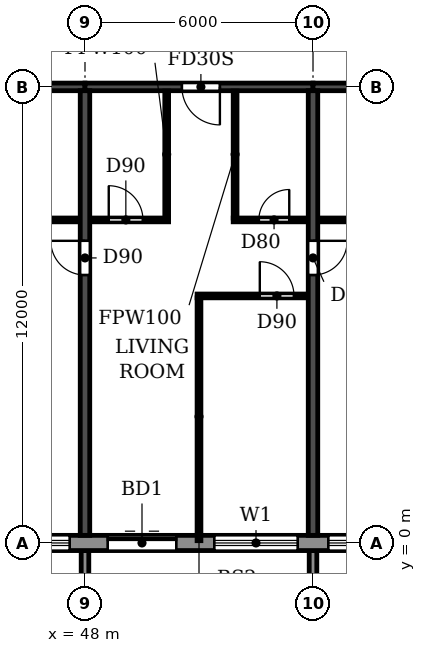
"""IFC4 building model, lengths in metres.
Left out: names, types, materials, properties, quantities, classifications, styles, units other than length and angle.
Written with IfcOpenShell. Run it as: python <this file> out.ifc"""

import sys

from ifc_helpers import new_model, si_unit, direction, frame, frame_2d, origin, place, context, subcontext, project, spatial, polyline, rectangle, outline, extrude, source, transform, mapped, element, fill, save


model = new_model("IFC4")
c1 = context("Model", 3, precision=1e-05, world=origin(), true_north=direction((0.0, 1.0)))
c2 = subcontext(c1, "Body", "Model", "MODEL_VIEW")
j1 = project(units=[si_unit("LENGTHUNIT", "METRE"), si_unit("PLANEANGLEUNIT", "RADIAN")], contexts=[c1])
p1 = place(None, origin())
s1 = spatial("IfcSite", under=j1, at=p1, CompositionType="ELEMENT")
p2 = place(p1, origin())
s2 = spatial("IfcBuilding", under=s1, at=p2, CompositionType="ELEMENT")
p3 = place(p2, frame((0.0, 0.0, 171.9)))
s3 = spatial("IfcBuildingStorey", under=s2, at=p3, CompositionType="ELEMENT", Elevation=171.9)
p4 = place(p3, frame((48.0, 0.2, 0.0), z_axis=(0.0, 0.0, 1.0), x_axis=(0.0, 1.0, 0.0)))
e1 = element("IfcWall", 1, at=p4, inside=s3, PredefinedType="SHEAR", context=c2, shape_type="SweptSolid", body=[
    extrude(rectangle(XDim=11.7, YDim=0.25, at=frame_2d((5.85, 0.0))), origin(), (0.0, 0.0, 1.0), 3.08),
])
p5 = place(p4, frame((6.85, 0.0, 0.0)))
e2 = element("IfcOpeningElement", 2, at=p5, cuts=e1, PredefinedType="OPENING", context=c2, shape_type="SweptSolid", body=[
    extrude(rectangle(XDim=0.9, YDim=2.1, at=frame_2d((0.45, 1.05))), frame((0.0, 0.135, 0.0), z_axis=(0.0, -1.0, 0.0), x_axis=(1.0, 0.0, 0.0)), (0.0, 0.0, 1.0), 0.27),
])
p6 = place(p3, frame((54.0, 0.2, 0.0), z_axis=(0.0, 0.0, 1.0), x_axis=(0.0, 1.0, 0.0)))
e3 = element("IfcWall", 3, at=p6, inside=s3, PredefinedType="SHEAR", context=c2, shape_type="SweptSolid", body=[
    extrude(rectangle(XDim=11.7, YDim=0.25, at=frame_2d((5.85, 0.0))), origin(), (0.0, 0.0, 1.0), 3.08),
])
p7 = place(p6, frame((6.85, 0.0, 0.0)))
e4 = element("IfcOpeningElement", 4, at=p7, cuts=e3, PredefinedType="OPENING", context=c2, shape_type="SweptSolid", body=[
    extrude(rectangle(XDim=0.9, YDim=2.1, at=frame_2d((0.45, 1.05))), frame((0.0, 0.135, 0.0), z_axis=(0.0, -1.0, 0.0), x_axis=(1.0, 0.0, 0.0)), (0.0, 0.0, 1.0), 0.27),
])
p8 = place(p3, frame((42.0, 12.0, 0.0), z_axis=(0.0, 0.0, 1.0), x_axis=(1.0, 0.0, 0.0)))
e5 = element("IfcWall", 5, at=p8, inside=s3, PredefinedType="SHEAR", context=c2, shape_type="SweptSolid", body=[
    extrude(rectangle(XDim=6.0, YDim=0.2, at=frame_2d((3.0, 0.0))), origin(), (0.0, 0.0, 1.0), 2.48),
])
p9 = place(p3, frame((48.0, 12.0, 0.0), z_axis=(0.0, 0.0, 1.0), x_axis=(1.0, 0.0, 0.0)))
e6 = element("IfcWall", 6, at=p9, inside=s3, PredefinedType="SHEAR", context=c2, shape_type="SweptSolid", body=[
    extrude(rectangle(XDim=6.0, YDim=0.2, at=frame_2d((3.0, 0.0))), origin(), (0.0, 0.0, 1.0), 2.48),
])
p10 = place(p9, frame((2.55, 0.0, 0.0)))
e7 = element("IfcOpeningElement", 7, at=p10, cuts=e6, PredefinedType="OPENING", context=c2, shape_type="SweptSolid", body=[
    extrude(rectangle(XDim=1.0, YDim=2.1, at=frame_2d((0.5, 1.05))), frame((0.0, 0.11, 0.0), z_axis=(0.0, -1.0, 0.0), x_axis=(1.0, 0.0, 0.0)), (0.0, 0.0, 1.0), 0.22),
])
p11 = place(p3, frame((54.0, 12.0, 0.0), z_axis=(0.0, 0.0, 1.0), x_axis=(1.0, 0.0, 0.0)))
e8 = element("IfcWall", 8, at=p11, inside=s3, PredefinedType="SHEAR", context=c2, shape_type="SweptSolid", body=[
    extrude(rectangle(XDim=6.0, YDim=0.2, at=frame_2d((3.0, 0.0))), origin(), (0.0, 0.0, 1.0), 2.48),
])
p12 = place(p3, frame((22.683, 0.0, 0.0), z_axis=(0.0, 0.0, 1.0), x_axis=(1.0, 0.0, 0.0)))
e9 = element("IfcWall", 9, at=p12, inside=s3, PredefinedType="STANDARD", context=c2, shape_type="SweptSolid", body=[
    extrude(rectangle(XDim=56.634, YDim=0.4, at=frame_2d((28.317, 0.0))), origin(), (0.0, 0.0, 1.0), 3.08),
])
p13 = place(p12, frame((1.717, 0.0, 0.9)))
e10 = element("IfcOpeningElement", 10, at=p13, cuts=e9, PredefinedType="OPENING", context=c2, shape_type="SweptSolid", body=[
    extrude(rectangle(XDim=2.2, YDim=1.5, at=frame_2d((1.1, 0.75))), frame((0.0, 0.21, 0.0), z_axis=(0.0, -1.0, 0.0), x_axis=(1.0, 0.0, 0.0)), (0.0, 0.0, 1.0), 0.42),
])
p14 = place(p12, frame((4.917, 0.0, 0.0)))
e11 = element("IfcOpeningElement", 11, at=p14, cuts=e9, PredefinedType="OPENING", context=c2, shape_type="SweptSolid", body=[
    extrude(rectangle(XDim=1.8, YDim=2.4, at=frame_2d((0.9, 1.2))), frame((0.0, 0.21, 0.0), z_axis=(0.0, -1.0, 0.0), x_axis=(1.0, 0.0, 0.0)), (0.0, 0.0, 1.0), 0.42),
])
p15 = place(p12, frame((7.717, 0.0, 0.9)))
e12 = element("IfcOpeningElement", 12, at=p15, cuts=e9, PredefinedType="OPENING", context=c2, shape_type="SweptSolid", body=[
    extrude(rectangle(XDim=2.2, YDim=1.5, at=frame_2d((1.1, 0.75))), frame((0.0, 0.21, 0.0), z_axis=(0.0, -1.0, 0.0), x_axis=(1.0, 0.0, 0.0)), (0.0, 0.0, 1.0), 0.42),
])
p16 = place(p12, frame((10.717, 0.0, 0.9)))
e13 = element("IfcOpeningElement", 13, at=p16, cuts=e9, PredefinedType="OPENING", context=c2, shape_type="SweptSolid", body=[
    extrude(rectangle(XDim=2.2, YDim=1.5, at=frame_2d((1.1, 0.75))), frame((0.0, 0.21, 0.0), z_axis=(0.0, -1.0, 0.0), x_axis=(1.0, 0.0, 0.0)), (0.0, 0.0, 1.0), 0.42),
])
p17 = place(p12, frame((13.717, 0.0, 0.9)))
e14 = element("IfcOpeningElement", 14, at=p17, cuts=e9, PredefinedType="OPENING", context=c2, shape_type="SweptSolid", body=[
    extrude(rectangle(XDim=2.2, YDim=1.5, at=frame_2d((1.1, 0.75))), frame((0.0, 0.21, 0.0), z_axis=(0.0, -1.0, 0.0), x_axis=(1.0, 0.0, 0.0)), (0.0, 0.0, 1.0), 0.42),
])
p18 = place(p12, frame((16.917, 0.0, 0.0)))
e15 = element("IfcOpeningElement", 15, at=p18, cuts=e9, PredefinedType="OPENING", context=c2, shape_type="SweptSolid", body=[
    extrude(rectangle(XDim=1.8, YDim=2.4, at=frame_2d((0.9, 1.2))), frame((0.0, 0.21, 0.0), z_axis=(0.0, -1.0, 0.0), x_axis=(1.0, 0.0, 0.0)), (0.0, 0.0, 1.0), 0.42),
])
p19 = place(p12, frame((19.717, 0.0, 0.9)))
e16 = element("IfcOpeningElement", 16, at=p19, cuts=e9, PredefinedType="OPENING", context=c2, shape_type="SweptSolid", body=[
    extrude(rectangle(XDim=2.2, YDim=1.5, at=frame_2d((1.1, 0.75))), frame((0.0, 0.21, 0.0), z_axis=(0.0, -1.0, 0.0), x_axis=(1.0, 0.0, 0.0)), (0.0, 0.0, 1.0), 0.42),
])
p20 = place(p12, frame((22.717, 0.0, 0.9)))
e17 = element("IfcOpeningElement", 17, at=p20, cuts=e9, PredefinedType="OPENING", context=c2, shape_type="SweptSolid", body=[
    extrude(rectangle(XDim=2.2, YDim=1.5, at=frame_2d((1.1, 0.75))), frame((0.0, 0.21, 0.0), z_axis=(0.0, -1.0, 0.0), x_axis=(1.0, 0.0, 0.0)), (0.0, 0.0, 1.0), 0.42),
])
p21 = place(p12, frame((25.917, 0.0, 0.0)))
e18 = element("IfcOpeningElement", 18, at=p21, cuts=e9, PredefinedType="OPENING", context=c2, shape_type="SweptSolid", body=[
    extrude(rectangle(XDim=1.8, YDim=2.4, at=frame_2d((0.9, 1.2))), frame((0.0, 0.21, 0.0), z_axis=(0.0, -1.0, 0.0), x_axis=(1.0, 0.0, 0.0)), (0.0, 0.0, 1.0), 0.42),
])
p22 = place(p12, frame((28.717, 0.0, 0.9)))
e19 = element("IfcOpeningElement", 19, at=p22, cuts=e9, PredefinedType="OPENING", context=c2, shape_type="SweptSolid", body=[
    extrude(rectangle(XDim=2.2, YDim=1.5, at=frame_2d((1.1, 0.75))), frame((0.0, 0.21, 0.0), z_axis=(0.0, -1.0, 0.0), x_axis=(1.0, 0.0, 0.0)), (0.0, 0.0, 1.0), 0.42),
])
p23 = place(p12, frame((31.717, 0.0, 0.9)))
e20 = element("IfcOpeningElement", 20, at=p23, cuts=e9, PredefinedType="OPENING", context=c2, shape_type="SweptSolid", body=[
    extrude(rectangle(XDim=2.2, YDim=1.5, at=frame_2d((1.1, 0.75))), frame((0.0, 0.21, 0.0), z_axis=(0.0, -1.0, 0.0), x_axis=(1.0, 0.0, 0.0)), (0.0, 0.0, 1.0), 0.42),
])
p24 = place(p12, frame((34.717, 0.0, 0.9)))
e21 = element("IfcOpeningElement", 21, at=p24, cuts=e9, PredefinedType="OPENING", context=c2, shape_type="SweptSolid", body=[
    extrude(rectangle(XDim=2.2, YDim=1.5, at=frame_2d((1.1, 0.75))), frame((0.0, 0.21, 0.0), z_axis=(0.0, -1.0, 0.0), x_axis=(1.0, 0.0, 0.0)), (0.0, 0.0, 1.0), 0.42),
])
p25 = place(p12, frame((37.717, 0.0, 0.9)))
e22 = element("IfcOpeningElement", 22, at=p25, cuts=e9, PredefinedType="OPENING", context=c2, shape_type="SweptSolid", body=[
    extrude(rectangle(XDim=2.2, YDim=1.5, at=frame_2d((1.1, 0.75))), frame((0.0, 0.21, 0.0), z_axis=(0.0, -1.0, 0.0), x_axis=(1.0, 0.0, 0.0)), (0.0, 0.0, 1.0), 0.42),
])
p26 = place(p12, frame((40.917, 0.0, 0.0)))
e23 = element("IfcOpeningElement", 23, at=p26, cuts=e9, PredefinedType="OPENING", context=c2, shape_type="SweptSolid", body=[
    extrude(rectangle(XDim=1.8, YDim=2.4, at=frame_2d((0.9, 1.2))), frame((0.0, 0.21, 0.0), z_axis=(0.0, -1.0, 0.0), x_axis=(1.0, 0.0, 0.0)), (0.0, 0.0, 1.0), 0.42),
])
p27 = place(p12, frame((43.717, 0.0, 0.9)))
e24 = element("IfcOpeningElement", 24, at=p27, cuts=e9, PredefinedType="OPENING", context=c2, shape_type="SweptSolid", body=[
    extrude(rectangle(XDim=2.2, YDim=1.5, at=frame_2d((1.1, 0.75))), frame((0.0, 0.21, 0.0), z_axis=(0.0, -1.0, 0.0), x_axis=(1.0, 0.0, 0.0)), (0.0, 0.0, 1.0), 0.42),
])
p28 = place(p12, frame((46.717, 0.0, 0.9)))
e25 = element("IfcOpeningElement", 25, at=p28, cuts=e9, PredefinedType="OPENING", context=c2, shape_type="SweptSolid", body=[
    extrude(rectangle(XDim=2.2, YDim=1.5, at=frame_2d((1.1, 0.75))), frame((0.0, 0.21, 0.0), z_axis=(0.0, -1.0, 0.0), x_axis=(1.0, 0.0, 0.0)), (0.0, 0.0, 1.0), 0.42),
])
p29 = place(p12, frame((49.717, 0.0, 0.9)))
e26 = element("IfcOpeningElement", 26, at=p29, cuts=e9, PredefinedType="OPENING", context=c2, shape_type="SweptSolid", body=[
    extrude(rectangle(XDim=2.2, YDim=1.5, at=frame_2d((1.1, 0.75))), frame((0.0, 0.21, 0.0), z_axis=(0.0, -1.0, 0.0), x_axis=(1.0, 0.0, 0.0)), (0.0, 0.0, 1.0), 0.42),
])
p30 = place(p12, frame((52.917, 0.0, 0.0)))
e27 = element("IfcOpeningElement", 27, at=p30, cuts=e9, PredefinedType="OPENING", context=c2, shape_type="SweptSolid", body=[
    extrude(rectangle(XDim=1.8, YDim=2.4, at=frame_2d((0.9, 1.2))), frame((0.0, 0.21, 0.0), z_axis=(0.0, -1.0, 0.0), x_axis=(1.0, 0.0, 0.0)), (0.0, 0.0, 1.0), 0.42),
])
m1 = source(origin(), c2, "Body", "SweptSolid", [
    extrude(outline(polyline([(0.0, 0.0), (0.2, 0.0), (0.2, 1.65), (0.0, 1.65), (0.0, 0.0)])), origin(), (0.0, 0.0, 1.0), 3.1),
])
for number, where in (
    (28, (47.9, -1.85, 0.0)),
    (29, (53.9, -1.85, 0.0)),
):
    element("IfcWall", number, at=place(p3, frame(where)), inside=s3, PredefinedType="STANDARD", context=c2, shape_type="MappedRepresentation", body=[
        mapped(m1, transform((0.0, 0.0, 0.0))),
    ])
p31 = place(p3, frame((50.95, 6.5, 0.0), z_axis=(0.0, 0.0, 1.0), x_axis=(1.0, 0.0, 0.0)))
e30 = element("IfcWall", 30, at=p31, inside=s3, PredefinedType="PARTITIONING", context=c2, shape_type="SweptSolid", body=[
    extrude(rectangle(XDim=2.915, YDim=0.1, at=frame_2d((1.458, 0.0))), origin(), (0.0, 0.0, 1.0), 3.08),
])
p32 = place(p31, frame((1.65, 0.0, 0.0)))
e31 = element("IfcOpeningElement", 31, at=p32, cuts=e30, PredefinedType="OPENING", context=c2, shape_type="SweptSolid", body=[
    extrude(rectangle(XDim=0.9, YDim=2.1, at=frame_2d((0.45, 1.05))), frame((0.0, 0.06, 0.0), z_axis=(0.0, -1.0, 0.0), x_axis=(1.0, 0.0, 0.0)), (0.0, 0.0, 1.0), 0.12),
])
p33 = place(p3, frame((45.1, 8.5, 0.0), z_axis=(0.0, 0.0, 1.0), x_axis=(1.0, 0.0, 0.0)))
e32 = element("IfcWall", 32, at=p33, inside=s3, PredefinedType="PARTITIONING", context=c2, shape_type="SweptSolid", body=[
    extrude(rectangle(XDim=2.765, YDim=0.1, at=frame_2d((1.382, 0.0))), origin(), (0.0, 0.0, 1.0), 3.08),
])
p34 = place(p33, frame((1.0, 0.0, 0.0)))
e33 = element("IfcOpeningElement", 33, at=p34, cuts=e32, PredefinedType="OPENING", context=c2, shape_type="SweptSolid", body=[
    extrude(rectangle(XDim=0.8, YDim=2.1, at=frame_2d((0.4, 1.05))), frame((0.0, 0.06, 0.0), z_axis=(0.0, -1.0, 0.0), x_axis=(1.0, 0.0, 0.0)), (0.0, 0.0, 1.0), 0.12),
])
p35 = place(p3, frame((48.135, 8.5, 0.0), z_axis=(0.0, 0.0, 1.0), x_axis=(1.0, 0.0, 0.0)))
e34 = element("IfcWall", 34, at=p35, inside=s3, PredefinedType="PARTITIONING", context=c2, shape_type="SweptSolid", body=[
    extrude(rectangle(XDim=2.065, YDim=0.1, at=frame_2d((1.032, 0.0))), origin(), (0.0, 0.0, 1.0), 3.08),
])
p36 = place(p35, frame((0.49, 0.0, 0.0)))
e35 = element("IfcOpeningElement", 35, at=p36, cuts=e34, PredefinedType="OPENING", context=c2, shape_type="SweptSolid", body=[
    extrude(rectangle(XDim=0.9, YDim=2.1, at=frame_2d((0.45, 1.05))), frame((0.0, 0.06, 0.0), z_axis=(0.0, -1.0, 0.0), x_axis=(1.0, 0.0, 0.0)), (0.0, 0.0, 1.0), 0.12),
])
p37 = place(p3, frame((51.9, 8.5, 0.0), z_axis=(0.0, 0.0, 1.0), x_axis=(1.0, 0.0, 0.0)))
e36 = element("IfcWall", 36, at=p37, inside=s3, PredefinedType="PARTITIONING", context=c2, shape_type="SweptSolid", body=[
    extrude(rectangle(XDim=1.965, YDim=0.1, at=frame_2d((0.982, 0.0))), origin(), (0.0, 0.0, 1.0), 3.08),
])
p38 = place(p37, frame((0.675, 0.0, 0.0)))
e37 = element("IfcOpeningElement", 37, at=p38, cuts=e36, PredefinedType="OPENING", context=c2, shape_type="SweptSolid", body=[
    extrude(rectangle(XDim=0.8, YDim=2.1, at=frame_2d((0.4, 1.05))), frame((0.0, 0.06, 0.0), z_axis=(0.0, -1.0, 0.0), x_axis=(1.0, 0.0, 0.0)), (0.0, 0.0, 1.0), 0.12),
])
p39 = place(p3, frame((54.135, 8.5, 0.0), z_axis=(0.0, 0.0, 1.0), x_axis=(1.0, 0.0, 0.0)))
e38 = element("IfcWall", 38, at=p39, inside=s3, PredefinedType="PARTITIONING", context=c2, shape_type="SweptSolid", body=[
    extrude(rectangle(XDim=2.765, YDim=0.1, at=frame_2d((1.382, 0.0))), origin(), (0.0, 0.0, 1.0), 3.08),
])
p40 = place(p39, frame((0.965, 0.0, 0.0)))
e39 = element("IfcOpeningElement", 39, at=p40, cuts=e38, PredefinedType="OPENING", context=c2, shape_type="SweptSolid", body=[
    extrude(rectangle(XDim=0.8, YDim=2.1, at=frame_2d((0.4, 1.05))), frame((0.0, 0.06, 0.0), z_axis=(0.0, -1.0, 0.0), x_axis=(1.0, 0.0, 0.0)), (0.0, 0.0, 1.0), 0.12),
])
p41 = place(p3, frame((50.15, 8.55, 0.0), z_axis=(0.0, 0.0, 1.0), x_axis=(0.0, 1.0, 0.0)))
e40 = element("IfcWall", 40, at=p41, inside=s3, PredefinedType="PARTITIONING", context=c2, shape_type="SweptSolid", body=[
    extrude(rectangle(XDim=3.34, YDim=0.1, at=frame_2d((1.67, 0.0))), origin(), (0.0, 0.0, 1.0), 3.08),
])
p42 = place(p3, frame((51.0, 0.06, 0.0), z_axis=(0.0, 0.0, 1.0), x_axis=(0.0, 1.0, 0.0)))
e41 = element("IfcWall", 41, at=p42, inside=s3, PredefinedType="PARTITIONING", context=c2, shape_type="SweptSolid", body=[
    extrude(rectangle(XDim=6.39, YDim=0.1, at=frame_2d((3.195, 0.0))), origin(), (0.0, 0.0, 1.0), 3.08),
])
p43 = place(p3, frame((51.95, 8.55, 0.0), z_axis=(0.0, 0.0, 1.0), x_axis=(0.0, 1.0, 0.0)))
e42 = element("IfcWall", 42, at=p43, inside=s3, PredefinedType="PARTITIONING", context=c2, shape_type="SweptSolid", body=[
    extrude(rectangle(XDim=3.34, YDim=0.1, at=frame_2d((1.67, 0.0))), origin(), (0.0, 0.0, 1.0), 3.08),
])
p44 = place(p20, origin())
e43 = element("IfcWindow", 43, at=p44, inside=s3, PartitioningType="DOUBLE_PANEL_HORIZONTAL", PredefinedType="WINDOW", context=c2, shape_type="SweptSolid", body=[
    extrude(rectangle(XDim=2.2, YDim=1.5, at=frame_2d((1.1, 0.75))), frame((0.0, 0.03, 0.0), z_axis=(0.0, -1.0, 0.0), x_axis=(1.0, 0.0, 0.0)), (0.0, 0.0, 1.0), 0.06),
])
fill(e17, e43)
p45 = place(p21, origin())
e44 = element("IfcDoor", 44, at=p45, inside=s3, OperationType="DOUBLE_DOOR_SLIDING", PredefinedType="DOOR", context=c2, shape_type="SweptSolid", body=[
    extrude(rectangle(XDim=1.8, YDim=2.4, at=frame_2d((0.9, 1.2))), frame((0.0, 0.025, 0.0), z_axis=(0.0, -1.0, 0.0), x_axis=(1.0, 0.0, 0.0)), (0.0, 0.0, 1.0), 0.05),
])
fill(e18, e44)
p46 = place(p22, origin())
e45 = element("IfcWindow", 45, at=p46, inside=s3, PartitioningType="DOUBLE_PANEL_HORIZONTAL", PredefinedType="WINDOW", context=c2, shape_type="SweptSolid", body=[
    extrude(rectangle(XDim=2.2, YDim=1.5, at=frame_2d((1.1, 0.75))), frame((0.0, 0.03, 0.0), z_axis=(0.0, -1.0, 0.0), x_axis=(1.0, 0.0, 0.0)), (0.0, 0.0, 1.0), 0.06),
])
fill(e19, e45)
p47 = place(p23, origin())
e46 = element("IfcWindow", 46, at=p47, inside=s3, PartitioningType="DOUBLE_PANEL_HORIZONTAL", PredefinedType="WINDOW", context=c2, shape_type="SweptSolid", body=[
    extrude(rectangle(XDim=2.2, YDim=1.5, at=frame_2d((1.1, 0.75))), frame((0.0, 0.03, 0.0), z_axis=(0.0, -1.0, 0.0), x_axis=(1.0, 0.0, 0.0)), (0.0, 0.0, 1.0), 0.06),
])
fill(e20, e46)
p48 = place(p5, origin())
e47 = element("IfcDoor", 47, at=p48, inside=s3, OperationType="SINGLE_SWING_RIGHT", PredefinedType="DOOR", context=c2, shape_type="SweptSolid", body=[
    extrude(rectangle(XDim=0.9, YDim=2.1, at=frame_2d((0.45, 1.05))), frame((0.0, 0.025, 0.0), z_axis=(0.0, -1.0, 0.0), x_axis=(1.0, 0.0, 0.0)), (0.0, 0.0, 1.0), 0.05),
])
fill(e2, e47)
p49 = place(p36, origin())
e48 = element("IfcDoor", 48, at=p49, inside=s3, OperationType="SINGLE_SWING_LEFT", PredefinedType="DOOR", context=c2, shape_type="SweptSolid", body=[
    extrude(rectangle(XDim=0.9, YDim=2.1, at=frame_2d((0.45, 1.05))), frame((0.0, 0.025, 0.0), z_axis=(0.0, -1.0, 0.0), x_axis=(1.0, 0.0, 0.0)), (0.0, 0.0, 1.0), 0.05),
])
fill(e35, e48)
p50 = place(p10, frame((1.0, 0.0, 0.0), z_axis=(0.0, 0.0, 1.0), x_axis=(-1.0, 0.0, 0.0)))
e49 = element("IfcDoor", 49, at=p50, inside=s3, OperationType="SINGLE_SWING_LEFT", PredefinedType="DOOR", context=c2, shape_type="SweptSolid", body=[
    extrude(rectangle(XDim=1.0, YDim=2.1, at=frame_2d((0.5, 1.05))), frame((0.0, 0.025, 0.0), z_axis=(0.0, -1.0, 0.0), x_axis=(1.0, 0.0, 0.0)), (0.0, 0.0, 1.0), 0.05),
])
fill(e7, e49)
p51 = place(p38, origin())
e50 = element("IfcDoor", 50, at=p51, inside=s3, OperationType="SINGLE_SWING_RIGHT", PredefinedType="DOOR", context=c2, shape_type="SweptSolid", body=[
    extrude(rectangle(XDim=0.8, YDim=2.1, at=frame_2d((0.4, 1.05))), frame((0.0, 0.025, 0.0), z_axis=(0.0, -1.0, 0.0), x_axis=(1.0, 0.0, 0.0)), (0.0, 0.0, 1.0), 0.05),
])
fill(e37, e50)
p52 = place(p32, origin())
e51 = element("IfcDoor", 51, at=p52, inside=s3, OperationType="SINGLE_SWING_LEFT", PredefinedType="DOOR", context=c2, shape_type="SweptSolid", body=[
    extrude(rectangle(XDim=0.9, YDim=2.1, at=frame_2d((0.45, 1.05))), frame((0.0, 0.025, 0.0), z_axis=(0.0, -1.0, 0.0), x_axis=(1.0, 0.0, 0.0)), (0.0, 0.0, 1.0), 0.05),
])
fill(e31, e51)
p53 = place(p7, frame((0.9, 0.0, 0.0), z_axis=(0.0, 0.0, 1.0), x_axis=(-1.0, 0.0, 0.0)))
e52 = element("IfcDoor", 52, at=p53, inside=s3, OperationType="SINGLE_SWING_LEFT", PredefinedType="DOOR", context=c2, shape_type="SweptSolid", body=[
    extrude(rectangle(XDim=0.9, YDim=2.1, at=frame_2d((0.45, 1.05))), frame((0.0, 0.025, 0.0), z_axis=(0.0, -1.0, 0.0), x_axis=(1.0, 0.0, 0.0)), (0.0, 0.0, 1.0), 0.05),
])
fill(e4, e52)
save(model, sys.argv[1])
